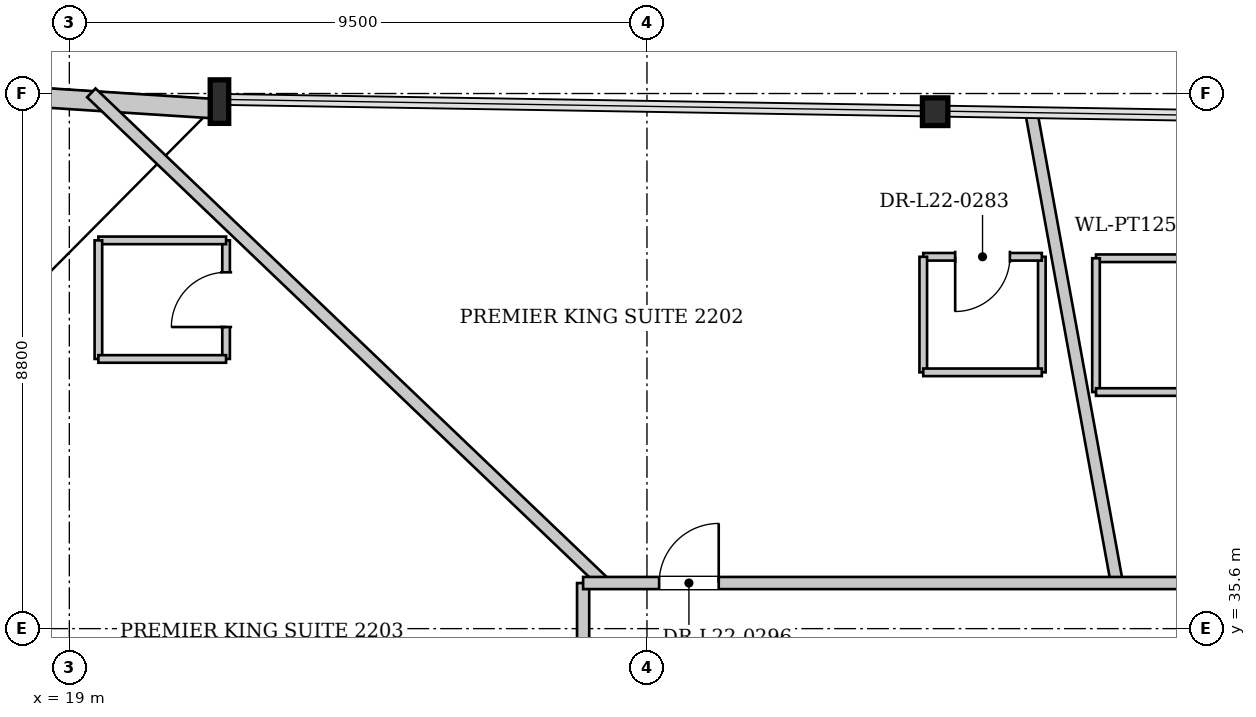
"""IFC4 building model, lengths in metres.
Left out: names, types, materials, properties, quantities, classifications, styles, units other than length and angle.
Written with IfcOpenShell. Run it as: python <this file> out.ifc"""

import sys

from ifc_helpers import new_model, si_unit, direction, frame, frame_2d, origin, origin_2d, place, context, subcontext, project, spatial, rectangle, i_section, extrude, source, transform, mapped, element, fill, save


model = new_model("IFC4")
c1 = context("Model", 3, precision=1e-05, world=origin(), true_north=direction((0.0, 1.0)))
c2 = subcontext(c1, "Body", "Model", "MODEL_VIEW")
j1 = project(units=[si_unit("LENGTHUNIT", "METRE"), si_unit("PLANEANGLEUNIT", "RADIAN")], contexts=[c1])
p1 = place(None, origin())
s1 = spatial("IfcSite", under=j1, at=p1, CompositionType="ELEMENT")
p2 = place(p1, origin())
s2 = spatial("IfcBuilding", under=s1, at=p2, CompositionType="ELEMENT")
p3 = place(p2, frame((0.0, 0.0, 87.95)))
s3 = spatial("IfcBuildingStorey", under=s2, at=p3, CompositionType="ELEMENT", Elevation=87.95)
m1 = source(origin(), c2, "Body", "SweptSolid", [
    extrude(i_section(OverallWidth=0.418, OverallDepth=0.455, WebThickness=0.038, FlangeThickness=0.059, at=origin_2d()), origin(), (0.0, 0.0, 1.0), 3.386),
])
p4 = place(p3, frame((33.278, 44.111, 0.0), z_axis=(-0.022496586915, -0.006128877845, 0.999728133261), x_axis=(0.262855729777, -0.964835149299, 0.0)))
e1 = element("IfcColumn", 1, at=p4, inside=s3, PredefinedType="COLUMN", context=c2, shape_type="MappedRepresentation", body=[
    mapped(m1, transform((0.0, 0.0, 0.0), x_axis=(1.0, 0.0, 0.0), y_axis=(0.0, 1.0, 0.0), z_axis=(0.0, 0.0, 1.0), scale=1.0)),
])
m2 = source(origin(), c2, "Body", "SweptSolid", [
    extrude(i_section(OverallWidth=0.304, OverallDepth=0.716, WebThickness=0.021, FlangeThickness=0.04, at=origin_2d()), origin(), (0.0, 0.0, 1.0), 3.387),
])
p5 = place(p3, frame((21.508, 44.303, 0.0), z_axis=(-0.022780095921, -0.021338317699, 0.999512753009), x_axis=(0.683633765281, -0.729825235908, 0.0)))
e2 = element("IfcColumn", 2, at=p5, inside=s3, PredefinedType="COLUMN", context=c2, shape_type="MappedRepresentation", body=[
    mapped(m2, transform((0.0, 0.0, 0.0), x_axis=(1.0, 0.0, 0.0), y_axis=(0.0, 1.0, 0.0), z_axis=(0.0, 0.0, 1.0), scale=1.0)),
])
p6 = place(p3, frame((18.384, 44.344, 0.0), z_axis=(0.0, 0.0, 1.0), x_axis=(0.997943597701, -0.064098173203, 0.0)))
e3 = element("IfcWall", 3, at=p6, inside=s3, PredefinedType="SOLIDWALL", context=c2, shape_type="SweptSolid", body=[
    extrude(rectangle(XDim=3.119, YDim=0.32, at=frame_2d((1.56, 0.0))), origin(), (0.0, 0.0, 1.0), 2.692),
])
p7 = place(p3, frame((36.228, 36.35, 0.0), z_axis=(0.0, 0.0, 1.0), x_axis=(-0.178797659558, 0.983885865808, 0.0)))
e4 = element("IfcWall", 4, at=p7, inside=s3, PredefinedType="PARTITIONING", context=c2, shape_type="SweptSolid", body=[
    extrude(rectangle(XDim=7.832, YDim=0.2, at=frame_2d((3.916, 0.0))), origin(), (0.0, 0.0, 1.0), 3.3),
])
p8 = place(p3, frame((27.797, 36.35, 0.0), z_axis=(0.0, 0.0, 1.0), x_axis=(-0.722973968358, 0.690875271722, 0.0)))
e5 = element("IfcWall", 5, at=p8, inside=s3, PredefinedType="PARTITIONING", context=c2, shape_type="SweptSolid", body=[
    extrude(rectangle(XDim=11.667, YDim=0.2, at=frame_2d((5.834, 0.0))), origin(), (0.0, 0.0, 1.0), 3.3),
])
p9 = place(p3, frame((38.185, 41.691, 0.0), z_axis=(0.0, 0.0, 1.0), x_axis=(-1.0, 0.0, 0.0)))
e6 = element("IfcWall", 6, at=p9, inside=s3, PredefinedType="PARTITIONING", context=c2, shape_type="SweptSolid", body=[
    extrude(rectangle(XDim=2.3, YDim=0.125, at=frame_2d((1.15, 0.0))), origin(), (0.0, 0.0, 1.0), 3.3),
])
p10 = place(p3, frame((35.885, 41.691, 0.0), z_axis=(0.0, 0.0, 1.0), x_axis=(0.0, -1.0, 0.0)))
e7 = element("IfcWall", 7, at=p10, inside=s3, PredefinedType="PARTITIONING", context=c2, shape_type="SweptSolid", body=[
    extrude(rectangle(XDim=2.2, YDim=0.125, at=frame_2d((1.1, 0.0))), origin(), (0.0, 0.0, 1.0), 3.3),
])
p11 = place(p3, frame((35.885, 39.491, 0.0), z_axis=(0.0, 0.0, 1.0), x_axis=(1.0, 0.0, 0.0)))
e8 = element("IfcWall", 8, at=p11, inside=s3, PredefinedType="PARTITIONING", context=c2, shape_type="SweptSolid", body=[
    extrude(rectangle(XDim=2.3, YDim=0.125, at=frame_2d((1.15, 0.0))), origin(), (0.0, 0.0, 1.0), 3.3),
])
p12 = place(p3, frame((34.994, 39.815, 0.0), z_axis=(0.0, 0.0, 1.0), x_axis=(0.0, 1.0, 0.0)))
e9 = element("IfcWall", 9, at=p12, inside=s3, PredefinedType="PARTITIONING", context=c2, shape_type="SweptSolid", body=[
    extrude(rectangle(XDim=1.9, YDim=0.125, at=frame_2d((0.95, 0.0))), origin(), (0.0, 0.0, 1.0), 3.3),
])
p13 = place(p3, frame((34.994, 41.715, 0.0), z_axis=(0.0, 0.0, 1.0), x_axis=(-1.0, 0.0, 0.0)))
e10 = element("IfcWall", 10, at=p13, inside=s3, PredefinedType="PARTITIONING", context=c2, shape_type="SweptSolid", body=[
    extrude(rectangle(XDim=1.95, YDim=0.125, at=frame_2d((0.975, 0.0))), origin(), (0.0, 0.0, 1.0), 3.3),
])
p14 = place(p13, frame((0.525, 0.0, 0.0)))
e11 = element("IfcOpeningElement", 11, at=p14, cuts=e10, PredefinedType="OPENING", context=c2, shape_type="SweptSolid", body=[
    extrude(rectangle(XDim=0.9, YDim=2.1, at=frame_2d((0.45, 1.05))), frame((0.0, 0.073, 0.0), z_axis=(0.0, -1.0, 0.0), x_axis=(1.0, 0.0, 0.0)), (0.0, 0.0, 1.0), 0.145),
])
p15 = place(p3, frame((33.044, 41.715, 0.0), z_axis=(0.0, 0.0, 1.0), x_axis=(0.0, -1.0, 0.0)))
e12 = element("IfcWall", 12, at=p15, inside=s3, PredefinedType="PARTITIONING", context=c2, shape_type="SweptSolid", body=[
    extrude(rectangle(XDim=1.9, YDim=0.125, at=frame_2d((0.95, 0.0))), origin(), (0.0, 0.0, 1.0), 3.3),
])
p16 = place(p3, frame((33.044, 39.815, 0.0), z_axis=(0.0, 0.0, 1.0), x_axis=(1.0, 0.0, 0.0)))
e13 = element("IfcWall", 13, at=p16, inside=s3, PredefinedType="PARTITIONING", context=c2, shape_type="SweptSolid", body=[
    extrude(rectangle(XDim=1.95, YDim=0.125, at=frame_2d((0.975, 0.0))), origin(), (0.0, 0.0, 1.0), 3.3),
])
p17 = place(p3, frame((21.578, 40.035, 0.0), z_axis=(0.0, 0.0, 1.0), x_axis=(0.0, 1.0, 0.0)))
e14 = element("IfcWall", 14, at=p17, inside=s3, PredefinedType="PARTITIONING", context=c2, shape_type="SweptSolid", body=[
    extrude(rectangle(XDim=1.95, YDim=0.125, at=frame_2d((0.975, 0.0))), origin(), (0.0, 0.0, 1.0), 3.3),
])
p18 = place(p17, frame((0.525, 0.0, 0.0)))
e15 = element("IfcOpeningElement", 15, at=p18, cuts=e14, PredefinedType="OPENING", context=c2, shape_type="SweptSolid", body=[
    extrude(rectangle(XDim=0.9, YDim=2.1, at=frame_2d((0.45, 1.05))), frame((0.0, 0.073, 0.0), z_axis=(0.0, -1.0, 0.0), x_axis=(1.0, 0.0, 0.0)), (0.0, 0.0, 1.0), 0.145),
])
p19 = place(p3, frame((21.578, 41.985, 0.0), z_axis=(0.0, 0.0, 1.0), x_axis=(-1.0, 0.0, 0.0)))
e16 = element("IfcWall", 16, at=p19, inside=s3, PredefinedType="PARTITIONING", context=c2, shape_type="SweptSolid", body=[
    extrude(rectangle(XDim=2.1, YDim=0.125, at=frame_2d((1.05, 0.0))), origin(), (0.0, 0.0, 1.0), 3.3),
])
p20 = place(p3, frame((19.478, 41.985, 0.0), z_axis=(0.0, 0.0, 1.0), x_axis=(0.0, -1.0, 0.0)))
e17 = element("IfcWall", 17, at=p20, inside=s3, PredefinedType="PARTITIONING", context=c2, shape_type="SweptSolid", body=[
    extrude(rectangle(XDim=1.95, YDim=0.125, at=frame_2d((0.975, 0.0))), origin(), (0.0, 0.0, 1.0), 3.3),
])
p21 = place(p3, frame((19.478, 40.035, 0.0), z_axis=(0.0, 0.0, 1.0), x_axis=(1.0, 0.0, 0.0)))
e18 = element("IfcWall", 18, at=p21, inside=s3, PredefinedType="PARTITIONING", context=c2, shape_type="SweptSolid", body=[
    extrude(rectangle(XDim=2.1, YDim=0.125, at=frame_2d((1.05, 0.0))), origin(), (0.0, 0.0, 1.0), 3.3),
])
p22 = place(p3, frame((27.45, 16.85, 0.0), z_axis=(0.0, 0.0, 1.0), x_axis=(0.0, 1.0, 0.0)))
e19 = element("IfcWall", 19, at=p22, inside=s3, PredefinedType="PARTITIONING", context=c2, shape_type="SweptSolid", body=[
    extrude(rectangle(XDim=19.5, YDim=0.2, at=frame_2d((9.75, 0.0))), origin(), (0.0, 0.0, 1.0), 3.3),
])
p23 = place(p22, frame((15.525, 0.0, 0.0)))
e20 = element("IfcOpeningElement", 20, at=p23, cuts=e19, PredefinedType="OPENING", context=c2, shape_type="SweptSolid", body=[
    extrude(rectangle(XDim=0.98, YDim=2.15, at=frame_2d((0.49, 1.075))), frame((0.0, 0.11, 0.0), z_axis=(0.0, -1.0, 0.0), x_axis=(1.0, 0.0, 0.0)), (0.0, 0.0, 1.0), 0.22),
])
p24 = place(p22, frame((6.543, 0.0, 0.0)))
e21 = element("IfcOpeningElement", 21, at=p24, cuts=e19, PredefinedType="OPENING", context=c2, shape_type="SweptSolid", body=[
    extrude(rectangle(XDim=0.98, YDim=2.15, at=frame_2d((0.49, 1.075))), frame((0.0, 0.11, 0.0), z_axis=(0.0, -1.0, 0.0), x_axis=(1.0, 0.0, 0.0)), (0.0, 0.0, 1.0), 0.22),
])
p25 = place(p3, frame((27.45, 36.35, 0.0), z_axis=(0.0, 0.0, 1.0), x_axis=(1.0, 0.0, 0.0)))
e22 = element("IfcWall", 22, at=p25, inside=s3, PredefinedType="PARTITIONING", context=c2, shape_type="SweptSolid", body=[
    extrude(rectangle(XDim=21.1, YDim=0.2, at=frame_2d((10.55, 0.0))), origin(), (0.0, 0.0, 1.0), 3.3),
])
p26 = place(p25, frame((13.109, 0.0, 0.0)))
e23 = element("IfcOpeningElement", 23, at=p26, cuts=e22, PredefinedType="OPENING", context=c2, shape_type="SweptSolid", body=[
    extrude(rectangle(XDim=0.98, YDim=2.15, at=frame_2d((0.49, 1.075))), frame((0.0, 0.11, 0.0), z_axis=(0.0, -1.0, 0.0), x_axis=(1.0, 0.0, 0.0)), (0.0, 0.0, 1.0), 0.22),
])
p27 = place(p25, frame((1.25, 0.0, 0.0)))
e24 = element("IfcOpeningElement", 24, at=p27, cuts=e22, PredefinedType="OPENING", context=c2, shape_type="SweptSolid", body=[
    extrude(rectangle(XDim=0.98, YDim=2.15, at=frame_2d((0.49, 1.075))), frame((0.0, 0.11, 0.0), z_axis=(0.0, -1.0, 0.0), x_axis=(1.0, 0.0, 0.0)), (0.0, 0.0, 1.0), 0.22),
])
p28 = place(p25, frame((19.82, 0.0, 0.0)))
e25 = element("IfcOpeningElement", 25, at=p28, cuts=e22, PredefinedType="OPENING", context=c2, shape_type="SweptSolid", body=[
    extrude(rectangle(XDim=0.98, YDim=2.15, at=frame_2d((0.49, 1.075))), frame((0.0, 0.11, 0.0), z_axis=(0.0, -1.0, 0.0), x_axis=(1.0, 0.0, 0.0)), (0.0, 0.0, 1.0), 0.22),
])
m3 = source(origin(), c2, "Body", "SweptSolid", [
    extrude(rectangle(XDim=0.9, YDim=2.1, at=frame_2d((0.45, 1.05))), frame((0.0, 0.025, 0.0), z_axis=(0.0, -1.0, 0.0), x_axis=(1.0, 0.0, 0.0)), (0.0, 0.0, 1.0), 0.05),
])
p29 = place(p14, origin())
e26 = element("IfcDoor", 26, at=p29, inside=s3, OperationType="SINGLE_SWING_RIGHT", PredefinedType="DOOR", context=c2, shape_type="MappedRepresentation", body=[
    mapped(m3, transform((0.0, 0.0, 0.0), x_axis=(1.0, 0.0, 0.0), y_axis=(0.0, 1.0, 0.0), z_axis=(0.0, 0.0, 1.0), scale=1.0)),
])
fill(e11, e26)
p30 = place(p18, origin())
e27 = element("IfcDoor", 27, at=p30, inside=s3, OperationType="SINGLE_SWING_LEFT", PredefinedType="DOOR", context=c2, shape_type="MappedRepresentation", body=[
    mapped(m3, transform((0.0, 0.0, 0.0), x_axis=(1.0, 0.0, 0.0), y_axis=(0.0, 1.0, 0.0), z_axis=(0.0, 0.0, 1.0), scale=1.0)),
])
fill(e15, e27)
m4 = source(origin(), c2, "Body", "SweptSolid", [
    extrude(rectangle(XDim=0.98, YDim=2.15, at=frame_2d((0.49, 1.075))), frame((0.0, 0.025, 0.0), z_axis=(0.0, -1.0, 0.0), x_axis=(1.0, 0.0, 0.0)), (0.0, 0.0, 1.0), 0.05),
])
p31 = place(p27, origin())
e28 = element("IfcDoor", 28, at=p31, inside=s3, OperationType="SINGLE_SWING_RIGHT", PredefinedType="DOOR", context=c2, shape_type="MappedRepresentation", body=[
    mapped(m4, transform((0.0, 0.0, 0.0), x_axis=(1.0, 0.0, 0.0), y_axis=(0.0, 1.0, 0.0), z_axis=(0.0, 0.0, 1.0), scale=1.0)),
])
fill(e24, e28)
save(model, sys.argv[1])
